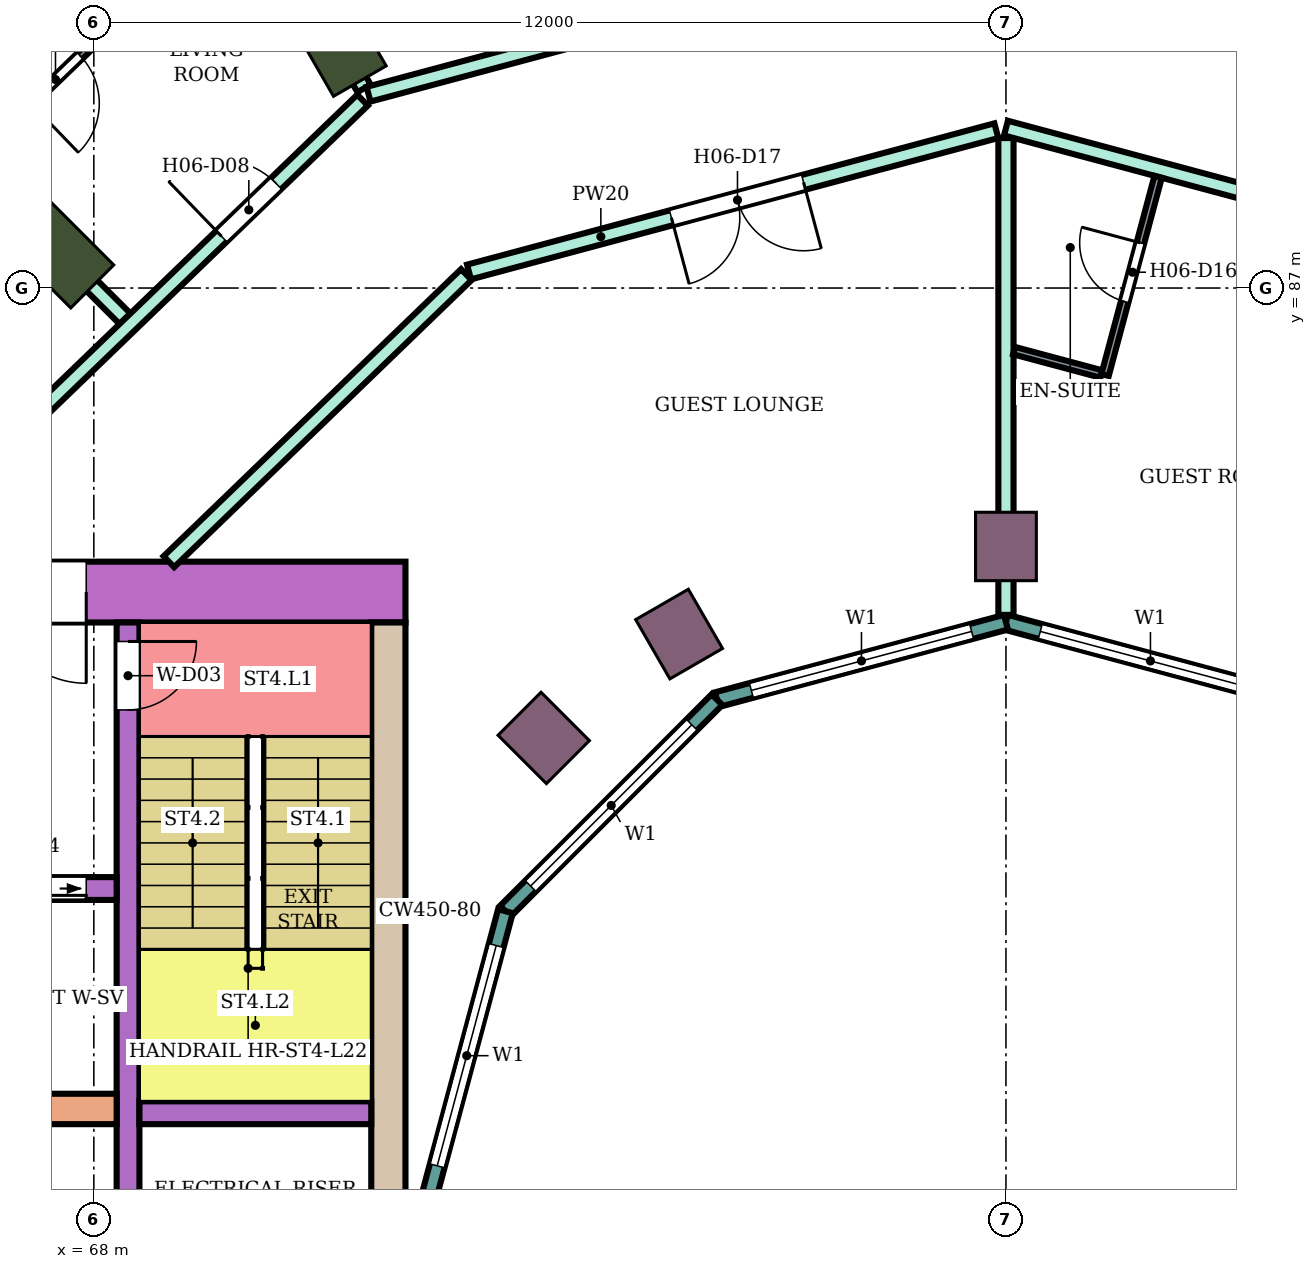
"""IFC4 building model, lengths in metres.
Left out: names, types, materials, properties, quantities, classifications, styles, units other than length and angle.
Written with IfcOpenShell. Run it as: python <this file> out.ifc"""

import sys

from ifc_helpers import new_model, si_unit, direction, frame, frame_2d, origin, origin_2d, place, context, subcontext, project, spatial, rectangle, extrude, element, fill, save


model = new_model("IFC4")
c1 = context("Model", 3, precision=1e-05, world=origin(), true_north=direction((0.0, 1.0)))
c2 = subcontext(c1, "Body", "Model", "MODEL_VIEW")
j1 = project(units=[si_unit("LENGTHUNIT", "METRE"), si_unit("PLANEANGLEUNIT", "RADIAN")], contexts=[c1])
p1 = place(None, origin())
s1 = spatial("IfcSite", under=j1, at=p1, CompositionType="ELEMENT")
p2 = place(p1, origin())
s2 = spatial("IfcBuilding", under=s1, at=p2, CompositionType="ELEMENT")
p3 = place(p2, frame((0.0, 0.0, 97.6)))
s3 = spatial("IfcBuildingStorey", under=s2, at=p3, CompositionType="ELEMENT", Elevation=97.6)
for number, where, z_axis, x_axis in (
    (1, (71.2, 90.242, 0.0), (0.0, 0.0, 1.0), (-0.5, 0.866, 0.0)),
    (2, (67.555, 87.445, 0.0), (0.0, 0.0, 1.0), (-0.707, 0.707, 0.0)),
):
    element("IfcColumn", number, at=place(p3, frame(where, z_axis=z_axis, x_axis=x_axis)), inside=s3, PredefinedType="COLUMN", context=c2, shape_type="SweptSolid", body=[
        extrude(rectangle(XDim=1.2, YDim=0.8, at=origin_2d()), origin(), (0.0, 0.0, 1.0), 3.8),
    ])
for number, where, z_axis, x_axis in (
    (3, (80.0, 83.6, 0.0), (0.0, 0.0, 1.0), (0.0, 1.0, 0.0)),
    (4, (75.7, 82.448, 0.0), (0.0, 0.0, 1.0), (-0.5, 0.866, 0.0)),
    (5, (73.919, 81.081, 0.0), (0.0, 0.0, 1.0), (-0.707, 0.707, 0.0)),
):
    element("IfcColumn", number, at=place(p3, frame(where, z_axis=z_axis, x_axis=x_axis)), inside=s3, PredefinedType="COLUMN", context=c2, shape_type="SweptSolid", body=[
        extrude(rectangle(XDim=0.9, YDim=0.8, at=origin_2d()), origin(), (0.0, 0.0, 1.0), 3.8),
    ])
p4 = place(p3, frame((72.1, 83.0, 0.0), z_axis=(0.0, 0.0, 1.0), x_axis=(-1.0, 0.0, 0.0)))
e6 = element("IfcWall", 6, at=p4, inside=s3, PredefinedType="SHEAR", context=c2, shape_type="SweptSolid", body=[
    extrude(rectangle(XDim=14.7, YDim=0.8, at=frame_2d((7.35, 0.0))), origin(), (0.0, 0.0, 1.0), 3.48),
])
p5 = place(p4, frame((4.2, 0.0, 0.0)))
e7 = element("IfcOpeningElement", 7, at=p5, cuts=e6, PredefinedType="OPENING", context=c2, shape_type="SweptSolid", body=[
    extrude(rectangle(XDim=2.4, YDim=2.4, at=frame_2d((1.2, 1.2))), frame((0.0, 0.41, 0.0), z_axis=(0.0, -1.0, 0.0), x_axis=(1.0, 0.0, 0.0)), (0.0, 0.0, 1.0), 0.82),
])
p6 = place(p3, frame((71.875, 82.6, 0.0), z_axis=(0.0, 0.0, 1.0), x_axis=(0.0, -1.0, 0.0)))
e8 = element("IfcWall", 8, at=p6, inside=s3, PredefinedType="SHEAR", context=c2, shape_type="SweptSolid", body=[
    extrude(rectangle(XDim=7.6, YDim=0.45, at=frame_2d((3.8, 0.0))), origin(), (0.0, 0.0, 1.0), 3.48),
])
p7 = place(p3, frame((68.45, 82.6, 0.0), z_axis=(0.0, 0.0, 1.0), x_axis=(0.0, -1.0, 0.0)))
e9 = element("IfcWall", 9, at=p7, inside=s3, PredefinedType="SHEAR", context=c2, shape_type="SweptSolid", body=[
    extrude(rectangle(XDim=7.6, YDim=0.3, at=frame_2d((3.8, 0.0))), origin(), (0.0, 0.0, 1.0), 3.48),
])
p8 = place(p7, frame((0.25, 0.0, 0.0)))
e10 = element("IfcOpeningElement", 10, at=p8, cuts=e9, PredefinedType="OPENING", context=c2, shape_type="SweptSolid", body=[
    extrude(rectangle(XDim=0.9, YDim=2.1, at=frame_2d((0.45, 1.05))), frame((0.0, 0.16, 0.0), z_axis=(0.0, -1.0, 0.0), x_axis=(1.0, 0.0, 0.0)), (0.0, 0.0, 1.0), 0.32),
])
p9 = place(p3, frame((71.65, 76.15, 0.0), z_axis=(0.0, 0.0, 1.0), x_axis=(-1.0, 0.0, 0.0)))
e11 = element("IfcWall", 11, at=p9, inside=s3, PredefinedType="SHEAR", context=c2, shape_type="SweptSolid", body=[
    extrude(rectangle(XDim=3.05, YDim=0.3, at=frame_2d((1.525, 0.0))), origin(), (0.0, 0.0, 1.0), 3.48),
])
p10 = place(p3, frame((68.3, 76.2, 0.0), z_axis=(0.0, 0.0, 1.0), x_axis=(-1.0, 0.0, 0.0)))
e12 = element("IfcWall", 12, at=p10, inside=s3, PredefinedType="SHEAR", context=c2, shape_type="SweptSolid", body=[
    extrude(rectangle(XDim=10.9, YDim=0.4, at=frame_2d((5.45, 0.0))), origin(), (0.0, 0.0, 1.0), 3.48),
])
p11 = place(p3, frame((68.3, 79.1, 0.0), z_axis=(0.0, 0.0, 1.0), x_axis=(-1.0, 0.0, 0.0)))
e13 = element("IfcWall", 13, at=p11, inside=s3, PredefinedType="SHEAR", context=c2, shape_type="SweptSolid", body=[
    extrude(rectangle(XDim=10.9, YDim=0.3, at=frame_2d((5.45, 0.0))), origin(), (0.0, 0.0, 1.0), 3.48),
])
p12 = place(p11, frame((0.4, 0.0, 0.0)))
e14 = element("IfcOpeningElement", 14, at=p12, cuts=e13, PredefinedType="OPENING", context=c2, shape_type="SweptSolid", body=[
    extrude(rectangle(XDim=1.4, YDim=2.1, at=frame_2d((0.7, 1.05))), frame((0.0, 0.16, 0.0), z_axis=(0.0, -1.0, 0.0), x_axis=(1.0, 0.0, 0.0)), (0.0, 0.0, 1.0), 0.32),
])
p13 = place(p11, frame((5.4, 0.0, 0.0)))
e15 = element("IfcOpeningElement", 15, at=p13, cuts=e13, PredefinedType="OPENING", context=c2, shape_type="SweptSolid", body=[
    extrude(rectangle(XDim=1.4, YDim=2.1, at=frame_2d((0.7, 1.05))), frame((0.0, 0.16, 0.0), z_axis=(0.0, -1.0, 0.0), x_axis=(1.0, 0.0, 0.0)), (0.0, 0.0, 1.0), 0.32),
])
p14 = place(p11, frame((8.1, 0.0, 0.0)))
e16 = element("IfcOpeningElement", 16, at=p14, cuts=e13, PredefinedType="OPENING", context=c2, shape_type="SweptSolid", body=[
    extrude(rectangle(XDim=1.0, YDim=2.1, at=frame_2d((0.5, 1.05))), frame((0.0, 0.16, 0.0), z_axis=(0.0, -1.0, 0.0), x_axis=(1.0, 0.0, 0.0)), (0.0, 0.0, 1.0), 0.32),
])
p15 = place(p3, frame((83.802, 81.585, 0.0), z_axis=(0.0, 0.0, 1.0), x_axis=(-0.965933654434, 0.258789828301, 0.0)))
e17 = element("IfcWall", 17, at=p15, inside=s3, PredefinedType="NOTDEFINED", context=c2, shape_type="SweptSolid", body=[
    extrude(rectangle(XDim=3.936, YDim=0.2, at=frame_2d((1.968, 0.0))), origin(), (0.0, 0.0, 1.0), 3.8),
])
p16 = place(p15, frame((0.468, 0.0, 0.9)))
e18 = element("IfcOpeningElement", 18, at=p16, cuts=e17, PredefinedType="OPENING", context=c2, shape_type="SweptSolid", body=[
    extrude(rectangle(XDim=3.0, YDim=2.3, at=frame_2d((1.5, 1.15))), frame((0.0, 0.11, 0.0), z_axis=(0.0, -1.0, 0.0), x_axis=(1.0, 0.0, 0.0)), (0.0, 0.0, 1.0), 0.22),
])
p17 = place(p3, frame((80.0, 82.604, 0.0), z_axis=(0.0, 0.0, 1.0), x_axis=(-0.965933654434, -0.258789828301, 0.0)))
e19 = element("IfcWall", 19, at=p17, inside=s3, PredefinedType="NOTDEFINED", context=c2, shape_type="SweptSolid", body=[
    extrude(rectangle(XDim=3.936, YDim=0.2, at=frame_2d((1.968, 0.0))), origin(), (0.0, 0.0, 1.0), 3.8),
])
p18 = place(p17, frame((0.468, 0.0, 0.9)))
e20 = element("IfcOpeningElement", 20, at=p18, cuts=e19, PredefinedType="OPENING", context=c2, shape_type="SweptSolid", body=[
    extrude(rectangle(XDim=3.0, YDim=2.3, at=frame_2d((1.5, 1.15))), frame((0.0, 0.11, 0.0), z_axis=(0.0, -1.0, 0.0), x_axis=(1.0, 0.0, 0.0)), (0.0, 0.0, 1.0), 0.22),
])
p19 = place(p3, frame((76.198, 81.585, 0.0), z_axis=(0.0, 0.0, 1.0), x_axis=(-0.707106781187, -0.707106781187, 0.0)))
e21 = element("IfcWall", 21, at=p19, inside=s3, PredefinedType="NOTDEFINED", context=c2, shape_type="SweptSolid", body=[
    extrude(rectangle(XDim=3.936, YDim=0.2, at=frame_2d((1.968, 0.0))), origin(), (0.0, 0.0, 1.0), 3.8),
])
p20 = place(p19, frame((0.468, 0.0, 0.9)))
e22 = element("IfcOpeningElement", 22, at=p20, cuts=e21, PredefinedType="OPENING", context=c2, shape_type="SweptSolid", body=[
    extrude(rectangle(XDim=3.0, YDim=2.3, at=frame_2d((1.5, 1.15))), frame((0.0, 0.11, 0.0), z_axis=(0.0, -1.0, 0.0), x_axis=(1.0, 0.0, 0.0)), (0.0, 0.0, 1.0), 0.22),
])
p21 = place(p3, frame((73.415, 78.802, 0.0), z_axis=(0.0, 0.0, 1.0), x_axis=(-0.258789828301, -0.965933654434, 0.0)))
e23 = element("IfcWall", 23, at=p21, inside=s3, PredefinedType="NOTDEFINED", context=c2, shape_type="SweptSolid", body=[
    extrude(rectangle(XDim=3.936, YDim=0.2, at=frame_2d((1.968, 0.0))), origin(), (0.0, 0.0, 1.0), 3.8),
])
p22 = place(p21, frame((0.468, 0.0, 0.9)))
e24 = element("IfcOpeningElement", 24, at=p22, cuts=e23, PredefinedType="OPENING", context=c2, shape_type="SweptSolid", body=[
    extrude(rectangle(XDim=3.0, YDim=2.3, at=frame_2d((1.5, 1.15))), frame((0.0, 0.11, 0.0), z_axis=(0.0, -1.0, 0.0), x_axis=(1.0, 0.0, 0.0)), (0.0, 0.0, 1.0), 0.22),
])
p23 = place(p3, frame((63.6, 91.409, 0.0), z_axis=(0.0, 0.0, 1.0), x_axis=(0.706945318761, -0.707268206752, 0.0)))
e25 = element("IfcWall", 25, at=p23, inside=s3, PredefinedType="PARTITIONING", context=c2, shape_type="SweptSolid", body=[
    extrude(rectangle(XDim=6.805, YDim=0.2, at=frame_2d((3.402, 0.0))), origin(), (0.0, 0.0, 1.0), 3.35),
])
p24 = place(p3, frame((66.796, 84.9, 0.0), z_axis=(0.0, 0.0, 1.0), x_axis=(0.719690784855, 0.694294731505, 0.0)))
e26 = element("IfcWall", 26, at=p24, inside=s3, PredefinedType="PARTITIONING", context=c2, shape_type="SweptSolid", body=[
    extrude(rectangle(XDim=6.585, YDim=0.2, at=frame_2d((3.292, 0.0))), origin(), (0.0, 0.0, 1.0), 3.35),
])
p25 = place(p24, frame((4.006, 0.0, 0.0)))
e27 = element("IfcOpeningElement", 27, at=p25, cuts=e26, PredefinedType="OPENING", context=c2, shape_type="SweptSolid", body=[
    extrude(rectangle(XDim=1.0, YDim=2.1, at=frame_2d((0.5, 1.05))), frame((0.0, 0.11, 0.0), z_axis=(0.0, -1.0, 0.0), x_axis=(1.0, 0.0, 0.0)), (0.0, 0.0, 1.0), 0.22),
])
p26 = place(p3, frame((67.102, 97.342, 0.0), z_axis=(0.0, 0.0, 1.0), x_axis=(0.499900389553, -0.866082906265, 0.0)))
e28 = element("IfcWall", 28, at=p26, inside=s3, PredefinedType="PARTITIONING", context=c2, shape_type="SweptSolid", body=[
    extrude(rectangle(XDim=8.908, YDim=0.2, at=frame_2d((4.454, 0.0))), origin(), (0.0, 0.0, 1.0), 3.35),
])
p27 = place(p3, frame((68.987, 83.4, 0.0), z_axis=(0.0, 0.0, 1.0), x_axis=(0.719586298962, 0.694403022997, 0.0)))
e29 = element("IfcWall", 29, at=p27, inside=s3, PredefinedType="PARTITIONING", context=c2, shape_type="SweptSolid", body=[
    extrude(rectangle(XDim=5.439, YDim=0.2, at=frame_2d((2.719, 0.0))), origin(), (0.0, 0.0, 1.0), 3.35),
])
p28 = place(p3, frame((71.614, 89.55, 0.0), z_axis=(0.0, 0.0, 1.0), x_axis=(0.965982378603, 0.258607896685, 0.0)))
e30 = element("IfcWall", 30, at=p28, inside=s3, PredefinedType="PARTITIONING", context=c2, shape_type="SweptSolid", body=[
    extrude(rectangle(XDim=8.632, YDim=0.2, at=frame_2d((4.316, 0.0))), origin(), (0.0, 0.0, 1.0), 3.35),
])
p29 = place(p28, frame((2.804, 0.0, 0.0)))
e31 = element("IfcOpeningElement", 31, at=p29, cuts=e30, PredefinedType="OPENING", context=c2, shape_type="SweptSolid", body=[
    extrude(rectangle(XDim=1.0, YDim=2.1, at=frame_2d((0.5, 1.05))), frame((0.0, 0.11, 0.0), z_axis=(0.0, -1.0, 0.0), x_axis=(1.0, 0.0, 0.0)), (0.0, 0.0, 1.0), 0.22),
])
p30 = place(p3, frame((72.936, 87.211, 0.0), z_axis=(0.0, 0.0, 1.0), x_axis=(0.965917703859, 0.258849356521, 0.0)))
e32 = element("IfcWall", 32, at=p30, inside=s3, PredefinedType="PARTITIONING", context=c2, shape_type="SweptSolid", body=[
    extrude(rectangle(XDim=7.182, YDim=0.2, at=frame_2d((3.591, 0.0))), origin(), (0.0, 0.0, 1.0), 3.35),
])
p31 = place(p30, frame((2.757, 0.0, 0.0)))
e33 = element("IfcOpeningElement", 33, at=p31, cuts=e32, PredefinedType="OPENING", context=c2, shape_type="SweptSolid", body=[
    extrude(rectangle(XDim=1.8, YDim=2.1, at=frame_2d((0.9, 1.05))), frame((0.0, 0.11, 0.0), z_axis=(0.0, -1.0, 0.0), x_axis=(1.0, 0.0, 0.0)), (0.0, 0.0, 1.0), 0.22),
])
p32 = place(p3, frame((80.0, 82.7, 0.0), z_axis=(0.0, 0.0, 1.0), x_axis=(0.0, 1.0, 0.0)))
e34 = element("IfcWall", 34, at=p32, inside=s3, PredefinedType="PARTITIONING", context=c2, shape_type="SweptSolid", body=[
    extrude(rectangle(XDim=6.273, YDim=0.2, at=frame_2d((3.136, 0.0))), origin(), (0.0, 0.0, 1.0), 3.35),
])
p33 = place(p3, frame((80.0, 89.104, 0.0), z_axis=(0.0, 0.0, 1.0), x_axis=(0.965856548257, -0.259077455964, 0.0)))
e35 = element("IfcWall", 35, at=p33, inside=s3, PredefinedType="PARTITIONING", context=c2, shape_type="SweptSolid", body=[
    extrude(rectangle(XDim=7.173, YDim=0.2, at=frame_2d((3.586, 0.0))), origin(), (0.0, 0.0, 1.0), 3.35),
])
p34 = place(p33, frame((5.763, 0.0, 0.0)))
e36 = element("IfcOpeningElement", 36, at=p34, cuts=e35, PredefinedType="OPENING", context=c2, shape_type="SweptSolid", body=[
    extrude(rectangle(XDim=1.0, YDim=2.1, at=frame_2d((0.5, 1.05))), frame((0.0, 0.11, 0.0), z_axis=(0.0, -1.0, 0.0), x_axis=(1.0, 0.0, 0.0)), (0.0, 0.0, 1.0), 0.22),
])
p35 = place(p3, frame((80.0, 91.796, 0.0), z_axis=(0.0, 0.0, 1.0), x_axis=(0.965917643923, -0.258849580177, 0.0)))
e37 = element("IfcWall", 37, at=p35, inside=s3, PredefinedType="PARTITIONING", context=c2, shape_type="SweptSolid", body=[
    extrude(rectangle(XDim=8.602, YDim=0.2, at=frame_2d((4.301, 0.0))), origin(), (0.0, 0.0, 1.0), 3.35),
])
p36 = place(p35, frame((2.091, 0.0, 0.0)))
e38 = element("IfcOpeningElement", 38, at=p36, cuts=e37, PredefinedType="OPENING", context=c2, shape_type="SweptSolid", body=[
    extrude(rectangle(XDim=1.8, YDim=2.1, at=frame_2d((0.9, 1.05))), frame((0.0, 0.11, 0.0), z_axis=(0.0, -1.0, 0.0), x_axis=(1.0, 0.0, 0.0)), (0.0, 0.0, 1.0), 0.22),
])
p37 = place(p3, frame((66.436, 88.72, 0.0), z_axis=(0.0, 0.0, 1.0), x_axis=(0.719585934284, 0.694403400899, 0.0)))
e39 = element("IfcWall", 39, at=p37, inside=s3, PredefinedType="PARTITIONING", context=c2, shape_type="SweptSolid", body=[
    extrude(rectangle(XDim=4.925, YDim=0.1, at=frame_2d((2.462, 0.0))), origin(), (0.0, 0.0, 1.0), 3.35),
])
p38 = place(p37, frame((1.022, 0.0, 0.0)))
e40 = element("IfcOpeningElement", 40, at=p38, cuts=e39, PredefinedType="OPENING", context=c2, shape_type="SweptSolid", body=[
    extrude(rectangle(XDim=0.9, YDim=2.1, at=frame_2d((0.45, 1.05))), frame((0.0, 0.06, 0.0), z_axis=(0.0, -1.0, 0.0), x_axis=(1.0, 0.0, 0.0)), (0.0, 0.0, 1.0), 0.12),
])
p39 = place(p3, frame((80.106, 86.177, 0.0), z_axis=(0.0, 0.0, 1.0), x_axis=(0.966002973184, -0.258530957139, 0.0)))
e41 = element("IfcWall", 41, at=p39, inside=s3, PredefinedType="PARTITIONING", context=c2, shape_type="SweptSolid", body=[
    extrude(rectangle(XDim=1.19, YDim=0.1, at=frame_2d((0.595, 0.0))), origin(), (0.0, 0.0, 1.0), 3.35),
])
p40 = place(p3, frame((81.304, 85.856, 0.0), z_axis=(0.0, 0.0, 1.0), x_axis=(0.25867580527, 0.965964195904, 0.0)))
e42 = element("IfcWall", 42, at=p40, inside=s3, PredefinedType="PARTITIONING", context=c2, shape_type="SweptSolid", body=[
    extrude(rectangle(XDim=2.699, YDim=0.1, at=frame_2d((1.35, 0.0))), origin(), (0.0, 0.0, 1.0), 3.35),
])
p41 = place(p40, frame((1.0, 0.0, 0.0)))
e43 = element("IfcOpeningElement", 43, at=p41, cuts=e42, PredefinedType="OPENING", context=c2, shape_type="SweptSolid", body=[
    extrude(rectangle(XDim=0.8, YDim=2.1, at=frame_2d((0.4, 1.05))), frame((0.0, 0.06, 0.0), z_axis=(0.0, -1.0, 0.0), x_axis=(1.0, 0.0, 0.0)), (0.0, 0.0, 1.0), 0.12),
])
p42 = place(p16, origin())
e44 = element("IfcWindow", 44, at=p42, inside=s3, PartitioningType="SINGLE_PANEL", PredefinedType="WINDOW", context=c2, shape_type="SweptSolid", body=[
    extrude(rectangle(XDim=3.0, YDim=2.3, at=frame_2d((1.5, 1.15))), frame((0.0, 0.03, 0.0), z_axis=(0.0, -1.0, 0.0), x_axis=(1.0, 0.0, 0.0)), (0.0, 0.0, 1.0), 0.06),
])
fill(e18, e44)
p43 = place(p18, origin())
e45 = element("IfcWindow", 45, at=p43, inside=s3, PartitioningType="SINGLE_PANEL", PredefinedType="WINDOW", context=c2, shape_type="SweptSolid", body=[
    extrude(rectangle(XDim=3.0, YDim=2.3, at=frame_2d((1.5, 1.15))), frame((0.0, 0.03, 0.0), z_axis=(0.0, -1.0, 0.0), x_axis=(1.0, 0.0, 0.0)), (0.0, 0.0, 1.0), 0.06),
])
fill(e20, e45)
p44 = place(p20, origin())
e46 = element("IfcWindow", 46, at=p44, inside=s3, PartitioningType="SINGLE_PANEL", PredefinedType="WINDOW", context=c2, shape_type="SweptSolid", body=[
    extrude(rectangle(XDim=3.0, YDim=2.3, at=frame_2d((1.5, 1.15))), frame((0.0, 0.03, 0.0), z_axis=(0.0, -1.0, 0.0), x_axis=(1.0, 0.0, 0.0)), (0.0, 0.0, 1.0), 0.06),
])
fill(e22, e46)
p45 = place(p22, origin())
e47 = element("IfcWindow", 47, at=p45, inside=s3, PartitioningType="SINGLE_PANEL", PredefinedType="WINDOW", context=c2, shape_type="SweptSolid", body=[
    extrude(rectangle(XDim=3.0, YDim=2.3, at=frame_2d((1.5, 1.15))), frame((0.0, 0.03, 0.0), z_axis=(0.0, -1.0, 0.0), x_axis=(1.0, 0.0, 0.0)), (0.0, 0.0, 1.0), 0.06),
])
fill(e24, e47)
p46 = place(p25, origin())
e48 = element("IfcDoor", 48, at=p46, inside=s3, OperationType="SINGLE_SWING_LEFT", PredefinedType="DOOR", context=c2, shape_type="SweptSolid", body=[
    extrude(rectangle(XDim=1.0, YDim=2.1, at=frame_2d((0.5, 1.05))), frame((0.0, 0.025, 0.0), z_axis=(0.0, -1.0, 0.0), x_axis=(1.0, 0.0, 0.0)), (0.0, 0.0, 1.0), 0.05),
])
fill(e27, e48)
p47 = place(p38, frame((0.9, 0.0, 0.0), z_axis=(0.0, 0.0, 1.0), x_axis=(-1.0, 0.0, 0.0)))
e49 = element("IfcDoor", 49, at=p47, inside=s3, OperationType="SINGLE_SWING_RIGHT", PredefinedType="DOOR", context=c2, shape_type="SweptSolid", body=[
    extrude(rectangle(XDim=0.9, YDim=2.1, at=frame_2d((0.45, 1.05))), frame((0.0, 0.025, 0.0), z_axis=(0.0, -1.0, 0.0), x_axis=(1.0, 0.0, 0.0)), (0.0, 0.0, 1.0), 0.05),
])
fill(e40, e49)
p48 = place(p41, origin())
e50 = element("IfcDoor", 50, at=p48, inside=s3, OperationType="SINGLE_SWING_RIGHT", PredefinedType="DOOR", context=c2, shape_type="SweptSolid", body=[
    extrude(rectangle(XDim=0.8, YDim=2.1, at=frame_2d((0.4, 1.05))), frame((0.0, 0.025, 0.0), z_axis=(0.0, -1.0, 0.0), x_axis=(1.0, 0.0, 0.0)), (0.0, 0.0, 1.0), 0.05),
])
fill(e43, e50)
p49 = place(p31, frame((1.8, 0.0, 0.0), z_axis=(0.0, 0.0, 1.0), x_axis=(-1.0, 0.0, 0.0)))
e51 = element("IfcDoor", 51, at=p49, inside=s3, OperationType="DOUBLE_DOOR_SINGLE_SWING", PredefinedType="DOOR", context=c2, shape_type="SweptSolid", body=[
    extrude(rectangle(XDim=1.8, YDim=2.1, at=frame_2d((0.9, 1.05))), frame((0.0, 0.025, 0.0), z_axis=(0.0, -1.0, 0.0), x_axis=(1.0, 0.0, 0.0)), (0.0, 0.0, 1.0), 0.05),
])
fill(e33, e51)
p50 = place(p8, origin())
e52 = element("IfcDoor", 52, at=p50, inside=s3, OperationType="SINGLE_SWING_LEFT", PredefinedType="DOOR", context=c2, shape_type="SweptSolid", body=[
    extrude(rectangle(XDim=0.9, YDim=2.1, at=frame_2d((0.45, 1.05))), frame((0.0, 0.025, 0.0), z_axis=(0.0, -1.0, 0.0), x_axis=(1.0, 0.0, 0.0)), (0.0, 0.0, 1.0), 0.05),
])
fill(e10, e52)
p51 = place(p12, origin())
e53 = element("IfcDoor", 53, at=p51, inside=s3, OperationType="DOUBLE_DOOR_SLIDING", PredefinedType="DOOR", context=c2, shape_type="SweptSolid", body=[
    extrude(rectangle(XDim=1.4, YDim=2.1, at=frame_2d((0.7, 1.05))), frame((0.0, 0.025, 0.0), z_axis=(0.0, -1.0, 0.0), x_axis=(1.0, 0.0, 0.0)), (0.0, 0.0, 1.0), 0.05),
])
fill(e14, e53)
p52 = place(p5, origin())
e54 = element("IfcDoor", 54, at=p52, inside=s3, OperationType="DOUBLE_DOOR_SINGLE_SWING", PredefinedType="DOOR", context=c2, shape_type="SweptSolid", body=[
    extrude(rectangle(XDim=2.4, YDim=2.4, at=frame_2d((1.2, 1.2))), frame((0.0, 0.025, 0.0), z_axis=(0.0, -1.0, 0.0), x_axis=(1.0, 0.0, 0.0)), (0.0, 0.0, 1.0), 0.05),
])
fill(e7, e54)
save(model, sys.argv[1])
